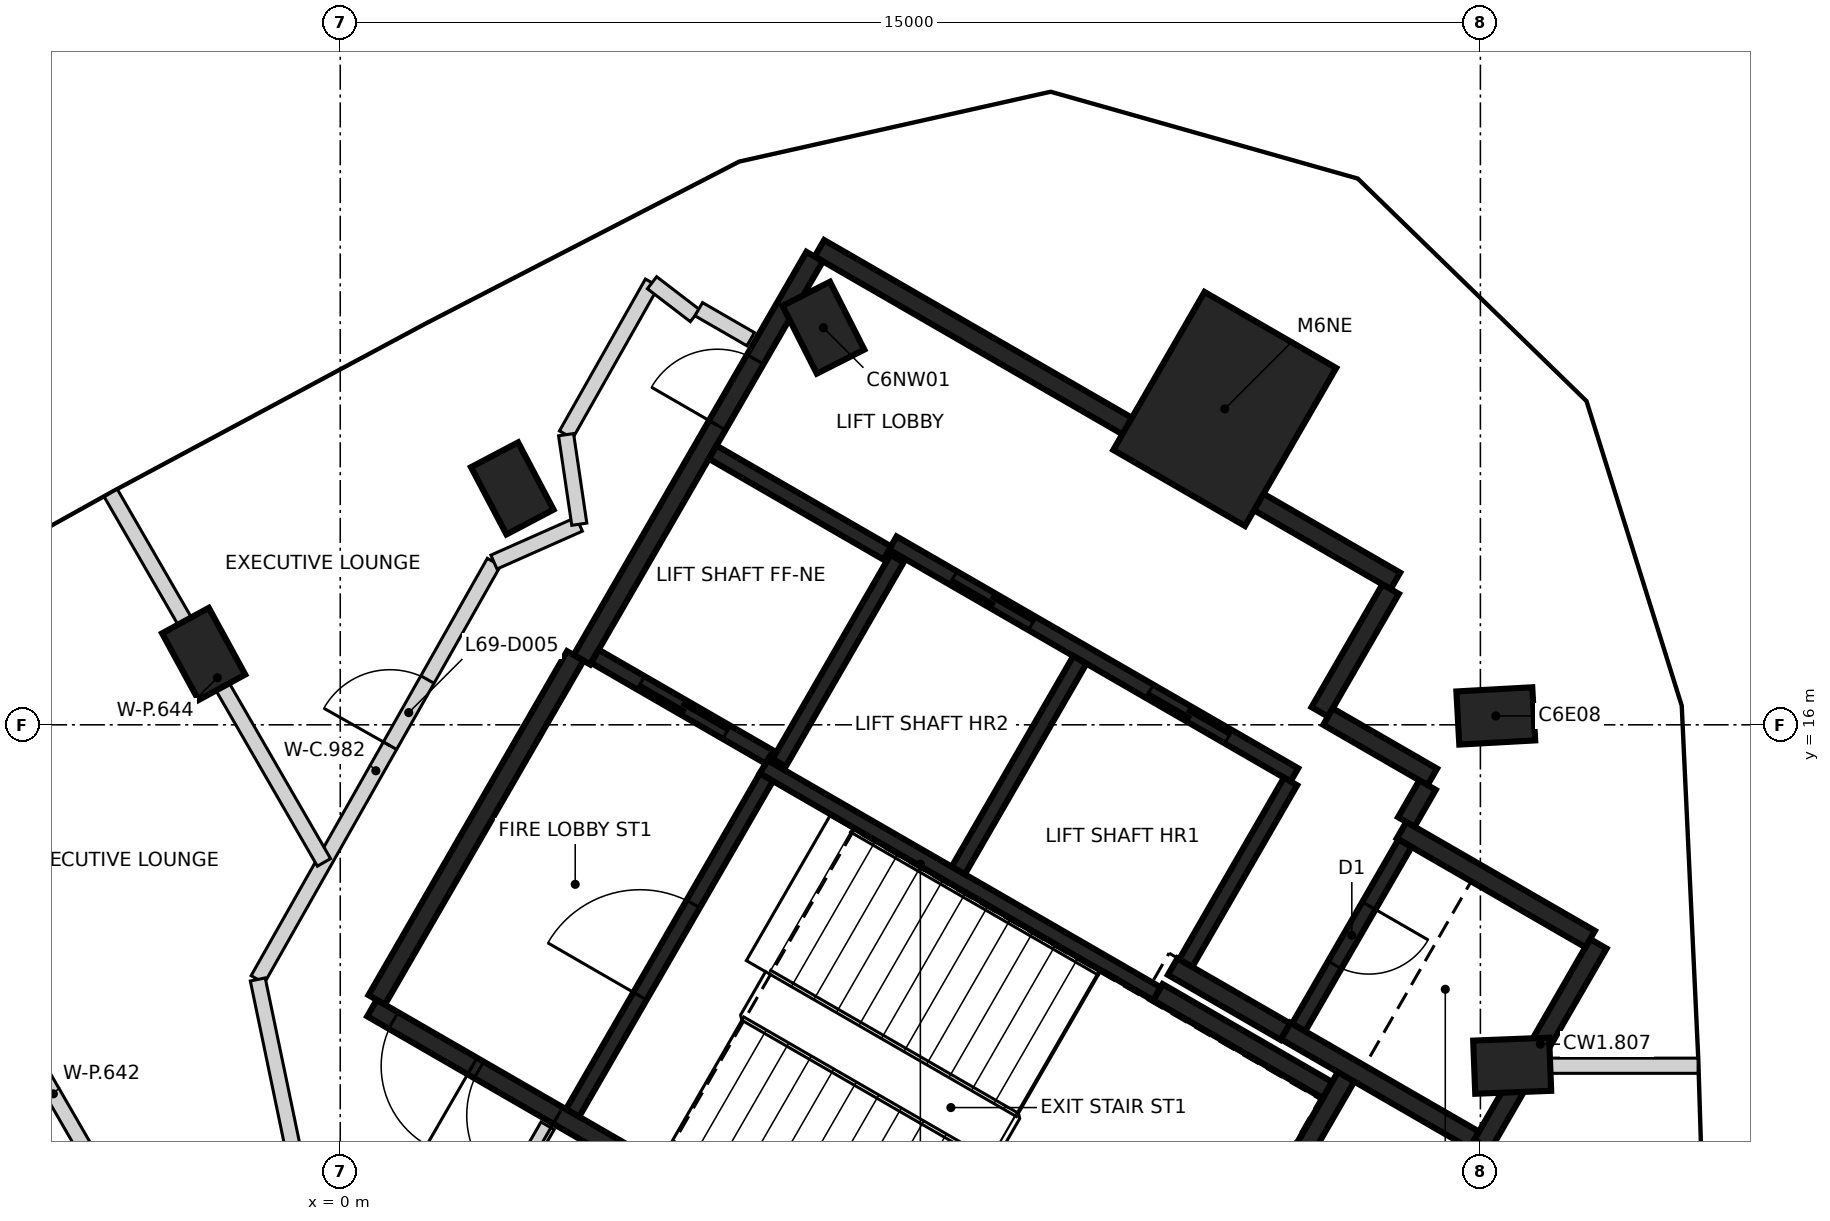
"""IFC4 building model, lengths in metres.
Left out: names, types, materials, properties, quantities, classifications, styles, units other than length and angle.
Written with IfcOpenShell. Run it as: python <this file> out.ifc"""

import sys

from ifc_helpers import new_model, si_unit, direction, frame, frame_2d, origin, origin_2d, place, context, subcontext, project, spatial, rectangle, extrude, element, fill, save


model = new_model("IFC4")
c1 = context("Model", 3, precision=1e-05, world=origin(), true_north=direction((0.0, 1.0)))
c2 = subcontext(c1, "Body", "Model", "MODEL_VIEW")
j1 = project(units=[si_unit("LENGTHUNIT", "METRE"), si_unit("PLANEANGLEUNIT", "RADIAN")], contexts=[c1])
p1 = place(None, origin())
s1 = spatial("IfcSite", under=j1, at=p1, CompositionType="ELEMENT")
p2 = place(p1, origin())
s2 = spatial("IfcBuilding", under=s1, at=p2, CompositionType="ELEMENT")
p3 = place(p2, frame((0.0, 0.0, 273.0)))
s3 = spatial("IfcBuildingStorey", under=s2, at=p3, CompositionType="ELEMENT", Elevation=273.0)
for number, where, z_axis, x_axis in (
    (1, (15.418, 11.515, -0.35), (0.0, 0.0, 1.0), (0.999, 0.039, 0.0)),
    (2, (15.202, 16.117, -0.35), (0.0, 0.0, 1.0), (0.998, 0.055, 0.0)),
    (3, (6.356, 21.224, -0.35), (0.0, 0.0, 1.0), (-0.452, 0.892, 0.0)),
    (4, (2.263, 19.11, -0.35), (0.0, 0.0, 1.0), (-0.466, 0.885, 0.0)),
    (5, (-1.797, 16.932, -0.35), (0.0, 0.0, 1.0), (-0.479, 0.878, 0.0)),
):
    element("IfcColumn", number, at=place(p3, frame(where, z_axis=z_axis, x_axis=x_axis)), inside=s3, PredefinedType="COLUMN", context=c2, shape_type="SweptSolid", body=[
        extrude(rectangle(XDim=1.0, YDim=0.7, at=origin_2d()), origin(), (0.0, 0.0, 1.0), 3.6),
    ])
p4 = place(p3, frame((11.637, 20.155, -0.35), z_axis=(0.0, 0.0, 1.0), x_axis=(0.5, 0.866025403784, 0.0)))
e6 = element("IfcColumn", 6, at=p4, inside=s3, PredefinedType="COLUMN", context=c2, shape_type="SweptSolid", body=[
    extrude(rectangle(XDim=2.4, YDim=2.0, at=origin_2d()), origin(), (0.0, 0.0, 1.0), 3.6),
])
p5 = place(p3, frame((10.42, 6.498, 0.0), z_axis=(0.0, 0.0, 1.0), x_axis=(-0.866021906294, 0.500006057782, 0.0)))
e7 = element("IfcWall", 7, at=p5, inside=s3, PredefinedType="SHEAR", context=c2, shape_type="SweptSolid", body=[
    extrude(rectangle(XDim=11.55, YDim=0.25, at=frame_2d((5.775, 0.0))), origin(), (0.0, 0.0, 1.0), 3.25),
])
p6 = place(p5, frame((10.025, 0.0, 0.0)))
e8 = element("IfcOpeningElement", 8, at=p6, cuts=e7, PredefinedType="OPENING", context=c2, shape_type="SweptSolid", body=[
    extrude(rectangle(XDim=1.2, YDim=2.1, at=frame_2d((0.6, 1.05))), frame((0.0, 0.135, 0.0), z_axis=(0.0, -1.0, 0.0), x_axis=(1.0, 0.0, 0.0)), (0.0, 0.0, 1.0), 0.27),
])
p7 = place(p5, frame((8.725, 0.0, 0.0)))
e9 = element("IfcOpeningElement", 9, at=p7, cuts=e7, PredefinedType="OPENING", context=c2, shape_type="SweptSolid", body=[
    extrude(rectangle(XDim=1.2, YDim=2.1, at=frame_2d((0.6, 1.05))), frame((0.0, 0.135, 0.0), z_axis=(0.0, -1.0, 0.0), x_axis=(1.0, 0.0, 0.0)), (0.0, 0.0, 1.0), 0.27),
])
p8 = place(p3, frame((6.304, 22.269, 0.0), z_axis=(0.0, 0.0, 1.0), x_axis=(0.866022959057, -0.500004234368, 0.0)))
e10 = element("IfcWall", 10, at=p8, inside=s3, PredefinedType="SHEAR", context=c2, shape_type="SweptSolid", body=[
    extrude(rectangle(XDim=8.75, YDim=0.25, at=frame_2d((4.375, 0.0))), origin(), (0.0, 0.0, 1.0), 3.25),
])
p9 = place(p3, frame((3.179, 16.856, 0.0), z_axis=(0.0, 0.0, 1.0), x_axis=(0.500001955336, 0.866024274868, 0.0)))
e11 = element("IfcWall", 11, at=p9, inside=s3, PredefinedType="SHEAR", context=c2, shape_type="SweptSolid", body=[
    extrude(rectangle(XDim=6.125, YDim=0.25, at=frame_2d((3.062, 0.0))), origin(), (0.0, 0.0, 1.0), 3.25),
])
p10 = place(p9, frame((3.563, 0.0, 0.0)))
e12 = element("IfcOpeningElement", 12, at=p10, cuts=e11, PredefinedType="OPENING", context=c2, shape_type="SweptSolid", body=[
    extrude(rectangle(XDim=1.0, YDim=2.1, at=frame_2d((0.5, 1.05))), frame((0.0, 0.135, 0.0), z_axis=(0.0, -1.0, 0.0), x_axis=(1.0, 0.0, 0.0)), (0.0, 0.0, 1.0), 0.27),
])
p11 = place(p3, frame((0.48, 12.381, 0.0), z_axis=(0.0, 0.0, 1.0), x_axis=(0.49999885962, 0.866026062182, 0.0)))
e13 = element("IfcWall", 13, at=p11, inside=s3, PredefinedType="SHEAR", context=c2, shape_type="SweptSolid", body=[
    extrude(rectangle(XDim=5.225, YDim=0.25, at=frame_2d((2.612, 0.0))), origin(), (0.0, 0.0, 1.0), 3.25),
])
p12 = place(p3, frame((13.238, 11.378, 0.0), z_axis=(0.0, 0.0, 1.0), x_axis=(-0.500008851346, -0.866020293397, 0.0)))
e14 = element("IfcWall", 14, at=p12, inside=s3, PredefinedType="SHEAR", context=c2, shape_type="SweptSolid", body=[
    extrude(rectangle(XDim=5.51, YDim=0.25, at=frame_2d((2.755, 0.0))), origin(), (0.0, 0.0, 1.0), 3.25),
])
p13 = place(p3, frame((16.552, 13.119, 0.0), z_axis=(0.0, 0.0, 1.0), x_axis=(-0.499978833458, -0.866037623948, 0.0)))
e15 = element("IfcWall", 15, at=p13, inside=s3, PredefinedType="SHEAR", context=c2, shape_type="SweptSolid", body=[
    extrude(rectangle(XDim=3.05, YDim=0.25, at=frame_2d((1.525, 0.0))), origin(), (0.0, 0.0, 1.0), 3.25),
])
p14 = place(p3, frame((14.918, 10.54, 0.0), z_axis=(0.0, 0.0, 1.0), x_axis=(-0.866063538972, 0.499933942099, 0.0)))
e16 = element("IfcWall", 16, at=p14, inside=s3, PredefinedType="SHEAR", context=c2, shape_type="SweptSolid", body=[
    extrude(rectangle(XDim=2.865, YDim=0.25, at=frame_2d((1.432, 0.0))), origin(), (0.0, 0.0, 1.0), 3.25),
])
p15 = place(p3, frame((13.963, 14.614, 0.0), z_axis=(0.0, 0.0, 1.0), x_axis=(0.866042235819, -0.499970844928, 0.0)))
e17 = element("IfcWall", 17, at=p15, inside=s3, PredefinedType="SHEAR", context=c2, shape_type="SweptSolid", body=[
    extrude(rectangle(XDim=2.865, YDim=0.25, at=frame_2d((1.432, 0.0))), origin(), (0.0, 0.0, 1.0), 3.25),
])
p16 = place(p3, frame((10.757, 12.481, 0.0), z_axis=(0.0, 0.0, 1.0), x_axis=(0.866022940537, -0.500004266446, 0.0)))
e18 = element("IfcWall", 18, at=p16, inside=s3, PredefinedType="SHEAR", context=c2, shape_type="SweptSolid", body=[
    extrude(rectangle(XDim=2.575, YDim=0.25, at=frame_2d((1.287, 0.0))), origin(), (0.0, 0.0, 1.0), 3.25),
])
p17 = place(p3, frame((13.819, 17.785, 0.0), z_axis=(0.0, 0.0, 1.0), x_axis=(-0.500039802285, -0.866002422705, 0.0)))
e19 = element("IfcWall", 19, at=p17, inside=s3, PredefinedType="SHEAR", context=c2, shape_type="SweptSolid", body=[
    extrude(rectangle(XDim=1.865, YDim=0.25, at=frame_2d((0.932, 0.0))), origin(), (0.0, 0.0, 1.0), 3.25),
])
p18 = place(p3, frame((12.433, 11.964, 0.0), z_axis=(0.0, 0.0, 1.0), x_axis=(-0.866038183914, 0.499977863513, 0.0)))
e20 = element("IfcWall", 20, at=p18, inside=s3, PredefinedType="SHEAR", context=c2, shape_type="SweptSolid", body=[
    extrude(rectangle(XDim=1.71, YDim=0.25, at=frame_2d((0.855, 0.0))), origin(), (0.0, 0.0, 1.0), 3.25),
])
p19 = place(p3, frame((12.995, 16.108, 0.0), z_axis=(0.0, 0.0, 1.0), x_axis=(0.866044474677, -0.49996696679, 0.0)))
e21 = element("IfcWall", 21, at=p19, inside=s3, PredefinedType="SHEAR", context=c2, shape_type="SweptSolid", body=[
    extrude(rectangle(XDim=1.584, YDim=0.25, at=frame_2d((0.792, 0.0))), origin(), (0.0, 0.0, 1.0), 3.25),
])
p20 = place(p3, frame((14.305, 15.207, 0.0), z_axis=(0.0, 0.0, 1.0), x_axis=(-0.499848422343, -0.866112899501, 0.0)))
e22 = element("IfcWall", 22, at=p20, inside=s3, PredefinedType="SHEAR", context=c2, shape_type="SweptSolid", body=[
    extrude(rectangle(XDim=0.559, YDim=0.25, at=frame_2d((0.28, 0.0))), origin(), (0.0, 0.0, 1.0), 3.25),
])
p21 = place(p3, frame((12.552, 15.342, 0.0), z_axis=(0.0, 0.0, 1.0), x_axis=(-0.866030299012, 0.499991521122, 0.0)))
e23 = element("IfcWall", 23, at=p21, inside=s3, PredefinedType="SHEAR", context=c2, shape_type="SweptSolid", body=[
    extrude(rectangle(XDim=6.1, YDim=0.2, at=frame_2d((3.05, 0.0))), origin(), (0.0, 0.0, 1.0), 3.25),
])
p22 = place(p21, frame((1.0, 0.0, 0.0)))
e24 = element("IfcOpeningElement", 24, at=p22, cuts=e23, PredefinedType="OPENING", context=c2, shape_type="SweptSolid", body=[
    extrude(rectangle(XDim=1.2, YDim=2.1, at=frame_2d((0.6, 1.05))), frame((0.0, 0.11, 0.0), z_axis=(0.0, -1.0, 0.0), x_axis=(1.0, 0.0, 0.0)), (0.0, 0.0, 1.0), 0.22),
])
p23 = place(p21, frame((3.982, 0.0, 0.0)))
e25 = element("IfcOpeningElement", 25, at=p23, cuts=e23, PredefinedType="OPENING", context=c2, shape_type="SweptSolid", body=[
    extrude(rectangle(XDim=1.2, YDim=2.1, at=frame_2d((0.6, 1.05))), frame((0.0, 0.11, 0.0), z_axis=(0.0, -1.0, 0.0), x_axis=(1.0, 0.0, 0.0)), (0.0, 0.0, 1.0), 0.22),
])
p24 = place(p3, frame((10.743, 12.46, 0.0), z_axis=(0.0, 0.0, 1.0), x_axis=(-0.866018848283, 0.500011354289, 0.0)))
e26 = element("IfcWall", 26, at=p24, inside=s3, PredefinedType="SHEAR", context=c2, shape_type="SweptSolid", body=[
    extrude(rectangle(XDim=5.974, YDim=0.2, at=frame_2d((2.987, 0.0))), origin(), (0.0, 0.0, 1.0), 3.25),
])
p25 = place(p3, frame((3.057, 10.895, 0.0), z_axis=(0.0, 0.0, 1.0), x_axis=(0.500027839223, 0.866009330205, 0.0)))
e27 = element("IfcWall", 27, at=p25, inside=s3, PredefinedType="SHEAR", context=c2, shape_type="SweptSolid", body=[
    extrude(rectangle(XDim=5.098, YDim=0.2, at=frame_2d((2.549, 0.0))), origin(), (0.0, 0.0, 1.0), 3.25),
])
p26 = place(p25, frame((1.774, 0.0, 0.0)))
e28 = element("IfcOpeningElement", 28, at=p26, cuts=e27, PredefinedType="OPENING", context=c2, shape_type="SweptSolid", body=[
    extrude(rectangle(XDim=1.4, YDim=2.1, at=frame_2d((0.7, 1.05))), frame((0.0, 0.11, 0.0), z_axis=(0.0, -1.0, 0.0), x_axis=(1.0, 0.0, 0.0)), (0.0, 0.0, 1.0), 0.22),
])
p27 = place(p3, frame((8.132, 14.084, 0.0), z_axis=(0.0, 0.0, 1.0), x_axis=(0.500030834389, 0.86600760081, 0.0)))
e29 = element("IfcWall", 29, at=p27, inside=s3, PredefinedType="SHEAR", context=c2, shape_type="SweptSolid", body=[
    extrude(rectangle(XDim=3.198, YDim=0.2, at=frame_2d((1.599, 0.0))), origin(), (0.0, 0.0, 1.0), 3.25),
])
p28 = place(p3, frame((14.008, 14.442, 0.0), z_axis=(0.0, 0.0, 1.0), x_axis=(-0.499986818241, -0.866033014143, 0.0)))
e30 = element("IfcWall", 30, at=p28, inside=s3, PredefinedType="SHEAR", context=c2, shape_type="SweptSolid", body=[
    extrude(rectangle(XDim=2.798, YDim=0.2, at=frame_2d((1.399, 0.0))), origin(), (0.0, 0.0, 1.0), 3.25),
])
p29 = place(p28, frame((0.949, 0.0, 0.0)))
e31 = element("IfcOpeningElement", 31, at=p29, cuts=e30, PredefinedType="OPENING", context=c2, shape_type="SweptSolid", body=[
    extrude(rectangle(XDim=0.9, YDim=2.1, at=frame_2d((0.45, 1.05))), frame((0.0, 0.11, 0.0), z_axis=(0.0, -1.0, 0.0), x_axis=(1.0, 0.0, 0.0)), (0.0, 0.0, 1.0), 0.22),
])
p30 = place(p3, frame((12.502, 15.255, 0.0), z_axis=(0.0, 0.0, 1.0), x_axis=(-0.499965018551, -0.866045599391, 0.0)))
e32 = element("IfcWall", 32, at=p30, inside=s3, PredefinedType="SHEAR", context=c2, shape_type="SweptSolid", body=[
    extrude(rectangle(XDim=2.759, YDim=0.2, at=frame_2d((1.379, 0.0))), origin(), (0.0, 0.0, 1.0), 3.25),
])
p31 = place(p3, frame((7.324, 18.187, 0.0), z_axis=(0.0, 0.0, 1.0), x_axis=(-0.499967891604, -0.866043940782, 0.0)))
e33 = element("IfcWall", 33, at=p31, inside=s3, PredefinedType="SHEAR", context=c2, shape_type="SweptSolid", body=[
    extrude(rectangle(XDim=3.1, YDim=0.2, at=frame_2d((1.55, 0.0))), origin(), (0.0, 0.0, 1.0), 3.25),
])
p32 = place(p3, frame((5.646, 15.576, 0.0), z_axis=(0.0, 0.0, 1.0), x_axis=(-0.866018407898, 0.500012117035, 0.0)))
e34 = element("IfcWall", 34, at=p32, inside=s3, PredefinedType="SHEAR", context=c2, shape_type="SweptSolid", body=[
    extrude(rectangle(XDim=2.651, YDim=0.2, at=frame_2d((1.325, 0.0))), origin(), (0.0, 0.0, 1.0), 3.25),
])
p33 = place(p32, frame((0.652, 0.0, 0.0)))
e35 = element("IfcOpeningElement", 35, at=p33, cuts=e34, PredefinedType="OPENING", context=c2, shape_type="SweptSolid", body=[
    extrude(rectangle(XDim=1.3, YDim=2.1, at=frame_2d((0.65, 1.05))), frame((0.0, 0.11, 0.0), z_axis=(0.0, -1.0, 0.0), x_axis=(1.0, 0.0, 0.0)), (0.0, 0.0, 1.0), 0.22),
])
p34 = place(p3, frame((7.196, 18.26, 0.0), z_axis=(0.0, 0.0, 1.0), x_axis=(-0.866018407898, 0.500012117035, 0.0)))
e36 = element("IfcWall", 36, at=p34, inside=s3, PredefinedType="SHEAR", context=c2, shape_type="SweptSolid", body=[
    extrude(rectangle(XDim=2.651, YDim=0.2, at=frame_2d((1.325, 0.0))), origin(), (0.0, 0.0, 1.0), 3.25),
])
p35 = place(p3, frame((-1.086, 12.65, 0.0), z_axis=(0.0, 0.0, 1.0), x_axis=(0.492563383526, 0.870276572826, 0.0)))
e37 = element("IfcWall", 37, at=p35, inside=s3, PredefinedType="PARTITIONING", context=c2, shape_type="SweptSolid", body=[
    extrude(rectangle(XDim=6.309, YDim=0.2, at=frame_2d((3.155, 0.0))), origin(), (0.0, 0.0, 1.0), 3.25),
])
p36 = place(p35, frame((3.533, 0.0, 0.0)))
e38 = element("IfcOpeningElement", 38, at=p36, cuts=e37, PredefinedType="OPENING", context=c2, shape_type="SweptSolid", body=[
    extrude(rectangle(XDim=1.0, YDim=2.1, at=frame_2d((0.5, 1.05))), frame((0.0, 0.11, 0.0), z_axis=(0.0, -1.0, 0.0), x_axis=(1.0, 0.0, 0.0)), (0.0, 0.0, 1.0), 0.22),
])
p37 = place(p3, frame((-1.085, 12.65, 0.0), z_axis=(0.0, 0.0, 1.0), x_axis=(0.203998862084, -0.97897112535, 0.0)))
e39 = element("IfcWall", 39, at=p37, inside=s3, PredefinedType="PARTITIONING", context=c2, shape_type="SweptSolid", body=[
    extrude(rectangle(XDim=6.338, YDim=0.2, at=frame_2d((3.169, 0.0))), origin(), (0.0, 0.0, 1.0), 3.25),
])
p38 = place(p37, frame((2.669, 0.0, 0.0)))
e40 = element("IfcOpeningElement", 40, at=p38, cuts=e39, PredefinedType="OPENING", context=c2, shape_type="SweptSolid", body=[
    extrude(rectangle(XDim=1.0, YDim=2.1, at=frame_2d((0.5, 1.05))), frame((0.0, 0.11, 0.0), z_axis=(0.0, -1.0, 0.0), x_axis=(1.0, 0.0, 0.0)), (0.0, 0.0, 1.0), 0.22),
])
p39 = place(p3, frame((2.022, 18.141, 0.0), z_axis=(0.0, 0.0, 1.0), x_axis=(0.914212683456, 0.405234709036, 0.0)))
e41 = element("IfcWall", 41, at=p39, inside=s3, PredefinedType="PARTITIONING", context=c2, shape_type="SweptSolid", body=[
    extrude(rectangle(XDim=1.229, YDim=0.2, at=frame_2d((0.614, 0.0))), origin(), (0.0, 0.0, 1.0), 3.25),
])
p40 = place(p3, frame((2.231, 9.864, 0.0), z_axis=(0.0, 0.0, 1.0), x_axis=(0.499942098031, 0.866058830921, 0.0)))
e42 = element("IfcWall", 42, at=p40, inside=s3, PredefinedType="PARTITIONING", context=c2, shape_type="SweptSolid", body=[
    extrude(rectangle(XDim=0.994, YDim=0.2, at=frame_2d((0.497, 0.0))), origin(), (0.0, 0.0, 1.0), 3.25),
])
p41 = place(p3, frame((2.971, 19.817, 0.0), z_axis=(0.0, 0.0, 1.0), x_axis=(0.492596700535, 0.870257715061, 0.0)))
e43 = element("IfcWall", 43, at=p41, inside=s3, PredefinedType="PARTITIONING", context=c2, shape_type="SweptSolid", body=[
    extrude(rectangle(XDim=2.296, YDim=0.2, at=frame_2d((1.148, 0.0))), origin(), (0.0, 0.0, 1.0), 3.25),
])
p42 = place(p3, frame((2.971, 19.817, 0.0), z_axis=(0.0, 0.0, 1.0), x_axis=(0.146184555477, -0.989257335449, 0.0)))
e44 = element("IfcWall", 44, at=p42, inside=s3, PredefinedType="PARTITIONING", context=c2, shape_type="SweptSolid", body=[
    extrude(rectangle(XDim=1.191, YDim=0.2, at=frame_2d((0.595, 0.0))), origin(), (0.0, 0.0, 1.0), 2.35),
])
p43 = place(p3, frame((4.102, 21.816, 0.0), z_axis=(0.0, 0.0, 1.0), x_axis=(0.793783006464, -0.608201067615, 0.0)))
e45 = element("IfcWall", 45, at=p43, inside=s3, PredefinedType="PARTITIONING", context=c2, shape_type="SweptSolid", body=[
    extrude(rectangle(XDim=0.712, YDim=0.2, at=frame_2d((0.356, 0.0))), origin(), (0.0, 0.0, 1.0), 3.25),
])
p44 = place(p3, frame((4.716, 21.468, 0.0), z_axis=(0.0, 0.0, 1.0), x_axis=(0.865912682783, -0.500195187698, 0.0)))
e46 = element("IfcWall", 46, at=p44, inside=s3, PredefinedType="PARTITIONING", context=c2, shape_type="SweptSolid", body=[
    extrude(rectangle(XDim=0.79, YDim=0.2, at=frame_2d((0.395, 0.0))), origin(), (0.0, 0.0, 1.0), 3.25),
])
p45 = place(p3, frame((-7.044, 16.809, 0.0), z_axis=(0.0, 0.0, 1.0), x_axis=(0.499997679687, -0.866026743414, 0.0)))
e47 = element("IfcWall", 47, at=p45, inside=s3, PredefinedType="PARTITIONING", context=c2, shape_type="SweptSolid", body=[
    extrude(rectangle(XDim=13.079, YDim=0.2, at=frame_2d((6.54, 0.0))), origin(), (0.0, 0.0, 1.0), 3.25),
])
p46 = place(p3, frame((-3.02, 19.05, 0.0), z_axis=(0.0, 0.0, 1.0), x_axis=(0.499943402613, -0.866058077835, 0.0)))
e48 = element("IfcWall", 48, at=p46, inside=s3, PredefinedType="PARTITIONING", context=c2, shape_type="SweptSolid", body=[
    extrude(rectangle(XDim=5.612, YDim=0.2, at=frame_2d((2.806, 0.0))), origin(), (0.0, 0.0, 1.0), 3.25),
])
p47 = place(p3, frame((15.84, 11.515, 0.0), z_axis=(0.0, 0.0, 1.0), x_axis=(1.0, 0.0, 0.0)))
e49 = element("IfcWall", 49, at=p47, inside=s3, PredefinedType="PARTITIONING", context=c2, shape_type="SweptSolid", body=[
    extrude(rectangle(XDim=2.025, YDim=0.2, at=frame_2d((1.012, 0.0))), origin(), (0.0, 0.0, 1.0), 3.25),
])
p48 = place(p33, origin())
e50 = element("IfcDoor", 50, at=p48, inside=s3, OperationType="SLIDING_TO_RIGHT", PredefinedType="DOOR", context=c2, shape_type="SweptSolid", body=[
    extrude(rectangle(XDim=1.3, YDim=2.1, at=frame_2d((0.65, 1.05))), frame((0.0, 0.025, 0.0), z_axis=(0.0, -1.0, 0.0), x_axis=(1.0, 0.0, 0.0)), (0.0, 0.0, 1.0), 0.05),
])
fill(e35, e50)
p49 = place(p22, origin())
e51 = element("IfcDoor", 51, at=p49, inside=s3, OperationType="DOUBLE_DOOR_SLIDING", PredefinedType="DOOR", context=c2, shape_type="SweptSolid", body=[
    extrude(rectangle(XDim=1.2, YDim=2.1, at=frame_2d((0.6, 1.05))), frame((0.0, 0.025, 0.0), z_axis=(0.0, -1.0, 0.0), x_axis=(1.0, 0.0, 0.0)), (0.0, 0.0, 1.0), 0.05),
])
fill(e24, e51)
p50 = place(p23, origin())
e52 = element("IfcDoor", 52, at=p50, inside=s3, OperationType="DOUBLE_DOOR_SLIDING", PredefinedType="DOOR", context=c2, shape_type="SweptSolid", body=[
    extrude(rectangle(XDim=1.2, YDim=2.1, at=frame_2d((0.6, 1.05))), frame((0.0, 0.025, 0.0), z_axis=(0.0, -1.0, 0.0), x_axis=(1.0, 0.0, 0.0)), (0.0, 0.0, 1.0), 0.05),
])
fill(e25, e52)
p51 = place(p10, origin())
e53 = element("IfcDoor", 53, at=p51, inside=s3, OperationType="SINGLE_SWING_LEFT", PredefinedType="DOOR", context=c2, shape_type="SweptSolid", body=[
    extrude(rectangle(XDim=1.0, YDim=2.1, at=frame_2d((0.5, 1.05))), frame((0.0, 0.025, 0.0), z_axis=(0.0, -1.0, 0.0), x_axis=(1.0, 0.0, 0.0)), (0.0, 0.0, 1.0), 0.05),
])
fill(e12, e53)
p52 = place(p6, origin())
e54 = element("IfcDoor", 54, at=p52, inside=s3, OperationType="SINGLE_SWING_LEFT", PredefinedType="DOOR", context=c2, shape_type="SweptSolid", body=[
    extrude(rectangle(XDim=1.2, YDim=2.1, at=frame_2d((0.6, 1.05))), frame((0.0, 0.025, 0.0), z_axis=(0.0, -1.0, 0.0), x_axis=(1.0, 0.0, 0.0)), (0.0, 0.0, 1.0), 0.05),
])
fill(e8, e54)
p53 = place(p7, origin())
e55 = element("IfcDoor", 55, at=p53, inside=s3, OperationType="SINGLE_SWING_RIGHT", PredefinedType="DOOR", context=c2, shape_type="SweptSolid", body=[
    extrude(rectangle(XDim=1.2, YDim=2.1, at=frame_2d((0.6, 1.05))), frame((0.0, 0.025, 0.0), z_axis=(0.0, -1.0, 0.0), x_axis=(1.0, 0.0, 0.0)), (0.0, 0.0, 1.0), 0.05),
])
fill(e9, e55)
p54 = place(p26, origin())
e56 = element("IfcDoor", 56, at=p54, inside=s3, OperationType="SINGLE_SWING_RIGHT", PredefinedType="DOOR", context=c2, shape_type="SweptSolid", body=[
    extrude(rectangle(XDim=1.4, YDim=2.1, at=frame_2d((0.7, 1.05))), frame((0.0, 0.025, 0.0), z_axis=(0.0, -1.0, 0.0), x_axis=(1.0, 0.0, 0.0)), (0.0, 0.0, 1.0), 0.05),
])
fill(e28, e56)
p55 = place(p29, origin())
e57 = element("IfcDoor", 57, at=p55, inside=s3, OperationType="SINGLE_SWING_LEFT", PredefinedType="DOOR", context=c2, shape_type="SweptSolid", body=[
    extrude(rectangle(XDim=0.9, YDim=2.1, at=frame_2d((0.45, 1.05))), frame((0.0, 0.025, 0.0), z_axis=(0.0, -1.0, 0.0), x_axis=(1.0, 0.0, 0.0)), (0.0, 0.0, 1.0), 0.05),
])
fill(e31, e57)
p56 = place(p36, frame((1.0, 0.0, 0.0), z_axis=(0.0, 0.0, 1.0), x_axis=(-1.0, 0.0, 0.0)))
e58 = element("IfcDoor", 58, at=p56, inside=s3, OperationType="SINGLE_SWING_LEFT", PredefinedType="DOOR", context=c2, shape_type="SweptSolid", body=[
    extrude(rectangle(XDim=1.0, YDim=2.1, at=frame_2d((0.5, 1.05))), frame((0.0, 0.025, 0.0), z_axis=(0.0, -1.0, 0.0), x_axis=(1.0, 0.0, 0.0)), (0.0, 0.0, 1.0), 0.05),
])
fill(e38, e58)
save(model, sys.argv[1])
